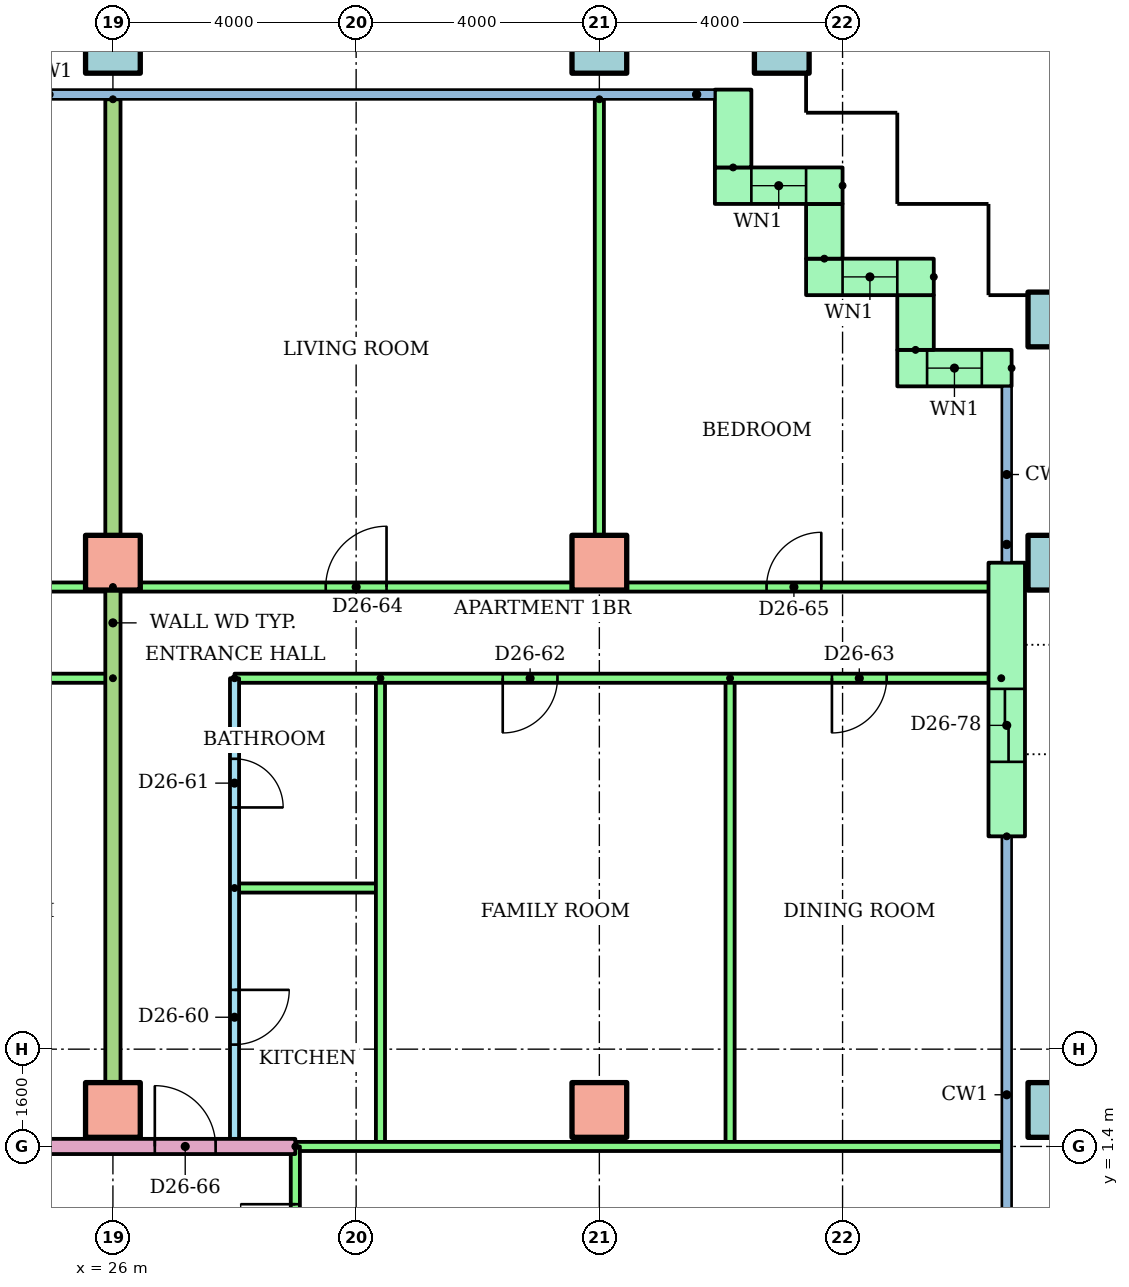
"""IFC4 building model, lengths in metres.
Left out: names, types, materials, properties, quantities, classifications, styles, units other than length and angle.
Written with IfcOpenShell. Run it as: python <this file> out.ifc"""

import sys

from ifc_helpers import new_model, si_unit, direction, frame, frame_2d, origin, origin_2d, place, context, subcontext, project, spatial, rectangle, hollow_rectangle, extrude, element, fill, save


model = new_model("IFC4")
c1 = context("Model", 3, precision=1e-05, world=origin(), true_north=direction((0.0, 1.0)))
c2 = subcontext(c1, "Body", "Model", "MODEL_VIEW")
j1 = project(units=[si_unit("LENGTHUNIT", "METRE"), si_unit("PLANEANGLEUNIT", "RADIAN")], contexts=[c1])
p1 = place(None, origin())
s1 = spatial("IfcSite", under=j1, at=p1, CompositionType="ELEMENT")
p2 = place(p1, origin())
s2 = spatial("IfcBuilding", under=s1, at=p2, CompositionType="ELEMENT")
p3 = place(p2, frame((0.0, 0.0, 99.9)))
s3 = spatial("IfcBuildingStorey", under=s2, at=p3, CompositionType="ELEMENT", Elevation=99.9)
for number, where in (
    (1, (26.0, 2.0, 0.0)),
    (2, (34.0, 2.0, 0.0)),
):
    element("IfcColumn", number, at=place(p3, frame(where)), inside=s3, PredefinedType="COLUMN", context=c2, shape_type="SweptSolid", body=[
        extrude(rectangle(XDim=0.9, YDim=0.9, at=origin_2d()), origin(), (0.0, 0.0, 1.0), 3.2),
    ])
p4 = place(p3, frame((41.5, 2.0, 0.0)))
e3 = element("IfcColumn", 3, at=p4, inside=s3, PredefinedType="COLUMN", context=c2, shape_type="SweptSolid", body=[
    extrude(hollow_rectangle(XDim=0.9, YDim=0.9, WallThickness=0.045, at=origin_2d()), origin(), (0.0, 0.0, 1.0), 3.2),
])
for number, where in (
    (4, (26.0, 11.0, 0.0)),
    (5, (34.0, 11.0, 0.0)),
):
    element("IfcColumn", number, at=place(p3, frame(where)), inside=s3, PredefinedType="COLUMN", context=c2, shape_type="SweptSolid", body=[
        extrude(rectangle(XDim=0.9, YDim=0.9, at=origin_2d()), origin(), (0.0, 0.0, 1.0), 3.2),
    ])
for number, where in (
    (6, (41.5, 11.0, 0.0)),
    (7, (41.5, 15.0, 0.0)),
    (8, (26.0, 19.5, 0.0)),
    (9, (34.0, 19.5, 0.0)),
    (10, (37.0, 19.5, 0.0)),
):
    element("IfcColumn", number, at=place(p3, frame(where)), inside=s3, PredefinedType="COLUMN", context=c2, shape_type="SweptSolid", body=[
        extrude(hollow_rectangle(XDim=0.9, YDim=0.9, WallThickness=0.045, at=origin_2d()), origin(), (0.0, 0.0, 1.0), 3.2),
    ])
p5 = place(p3, frame((40.78, 14.2, 0.0), z_axis=(0.0, 0.0, 1.0), x_axis=(-1.0, 0.0, 0.0)))
e11 = element("IfcWall", 11, at=p5, inside=s3, PredefinedType="STANDARD", context=c2, shape_type="SweptSolid", body=[
    extrude(rectangle(XDim=1.88, YDim=0.6, at=frame_2d((0.94, 0.0))), origin(), (0.0, 0.0, 1.0), 2.92),
])
p6 = place(p5, frame((0.49, 0.0, 0.9)))
e12 = element("IfcOpeningElement", 12, at=p6, cuts=e11, PredefinedType="OPENING", context=c2, shape_type="SweptSolid", body=[
    extrude(rectangle(XDim=0.9, YDim=1.5, at=frame_2d((0.45, 0.75))), frame((0.0, 0.31, 0.0), z_axis=(0.0, -1.0, 0.0), x_axis=(1.0, 0.0, 0.0)), (0.0, 0.0, 1.0), 0.62),
])
p7 = place(p3, frame((39.2, 14.5, 0.0), z_axis=(0.0, 0.0, 1.0), x_axis=(0.0, 1.0, 0.0)))
e13 = element("IfcWall", 13, at=p7, inside=s3, PredefinedType="STANDARD", context=c2, shape_type="SweptSolid", body=[
    extrude(rectangle(XDim=0.9, YDim=0.6, at=frame_2d((0.45, 0.0))), origin(), (0.0, 0.0, 1.0), 2.92),
])
p8 = place(p3, frame((39.5, 15.7, 0.0), z_axis=(0.0, 0.0, 1.0), x_axis=(-1.0, 0.0, 0.0)))
e14 = element("IfcWall", 14, at=p8, inside=s3, PredefinedType="STANDARD", context=c2, shape_type="SweptSolid", body=[
    extrude(rectangle(XDim=2.1, YDim=0.6, at=frame_2d((1.05, 0.0))), origin(), (0.0, 0.0, 1.0), 2.92),
])
p9 = place(p8, frame((0.6, 0.0, 0.9)))
e15 = element("IfcOpeningElement", 15, at=p9, cuts=e14, PredefinedType="OPENING", context=c2, shape_type="SweptSolid", body=[
    extrude(rectangle(XDim=0.9, YDim=1.5, at=frame_2d((0.45, 0.75))), frame((0.0, 0.31, 0.0), z_axis=(0.0, -1.0, 0.0), x_axis=(1.0, 0.0, 0.0)), (0.0, 0.0, 1.0), 0.62),
])
p10 = place(p3, frame((37.7, 16.0, 0.0), z_axis=(0.0, 0.0, 1.0), x_axis=(0.0, 1.0, 0.0)))
e16 = element("IfcWall", 16, at=p10, inside=s3, PredefinedType="STANDARD", context=c2, shape_type="SweptSolid", body=[
    extrude(rectangle(XDim=0.9, YDim=0.6, at=frame_2d((0.45, 0.0))), origin(), (0.0, 0.0, 1.0), 2.92),
])
p11 = place(p3, frame((38.0, 17.2, 0.0), z_axis=(0.0, 0.0, 1.0), x_axis=(-1.0, 0.0, 0.0)))
e17 = element("IfcWall", 17, at=p11, inside=s3, PredefinedType="STANDARD", context=c2, shape_type="SweptSolid", body=[
    extrude(rectangle(XDim=2.1, YDim=0.6, at=frame_2d((1.05, 0.0))), origin(), (0.0, 0.0, 1.0), 2.92),
])
p12 = place(p11, frame((0.6, 0.0, 0.9)))
e18 = element("IfcOpeningElement", 18, at=p12, cuts=e17, PredefinedType="OPENING", context=c2, shape_type="SweptSolid", body=[
    extrude(rectangle(XDim=0.9, YDim=1.5, at=frame_2d((0.45, 0.75))), frame((0.0, 0.31, 0.0), z_axis=(0.0, -1.0, 0.0), x_axis=(1.0, 0.0, 0.0)), (0.0, 0.0, 1.0), 0.62),
])
p13 = place(p3, frame((36.2, 17.5, 0.0), z_axis=(0.0, 0.0, 1.0), x_axis=(0.0, 1.0, 0.0)))
e19 = element("IfcWall", 19, at=p13, inside=s3, PredefinedType="STANDARD", context=c2, shape_type="SweptSolid", body=[
    extrude(rectangle(XDim=1.28, YDim=0.6, at=frame_2d((0.64, 0.0))), origin(), (0.0, 0.0, 1.0), 2.92),
])
p14 = place(p3, frame((40.7, 6.5, 0.0), z_axis=(0.0, 0.0, 1.0), x_axis=(0.0, 1.0, 0.0)))
e20 = element("IfcWall", 20, at=p14, inside=s3, PredefinedType="STANDARD", context=c2, shape_type="SweptSolid", body=[
    extrude(rectangle(XDim=4.5, YDim=0.6, at=frame_2d((2.25, 0.0))), origin(), (0.0, 0.0, 1.0), 2.92),
])
p15 = place(p14, frame((1.225, 0.0, 0.0)))
e21 = element("IfcOpeningElement", 21, at=p15, cuts=e20, PredefinedType="OPENING", context=c2, shape_type="SweptSolid", body=[
    extrude(rectangle(XDim=1.2, YDim=2.1, at=frame_2d((0.6, 1.05))), frame((0.0, 0.31, 0.0), z_axis=(0.0, -1.0, 0.0), x_axis=(1.0, 0.0, 0.0)), (0.0, 0.0, 1.0), 0.62),
])
p16 = place(p3, frame((26.0, 9.1, 0.0), z_axis=(0.0, 0.0, 1.0), x_axis=(-1.0, 0.0, 0.0)))
e22 = element("IfcWall", 22, at=p16, inside=s3, PredefinedType="PARTITIONING", context=c2, shape_type="SweptSolid", body=[
    extrude(rectangle(XDim=10.0, YDim=0.15, at=frame_2d((5.0, 0.0))), origin(), (0.0, 0.0, 1.0), 2.4),
])
p17 = place(p16, frame((5.525, 0.0, 0.0)))
e23 = element("IfcOpeningElement", 23, at=p17, cuts=e22, PredefinedType="OPENING", context=c2, shape_type="SweptSolid", body=[
    extrude(rectangle(XDim=0.9, YDim=2.1, at=frame_2d((0.45, 1.05))), frame((0.0, 0.085, 0.0), z_axis=(0.0, -1.0, 0.0), x_axis=(1.0, 0.0, 0.0)), (0.0, 0.0, 1.0), 0.17),
])
p18 = place(p16, frame((1.725, 0.0, 0.0)))
e24 = element("IfcOpeningElement", 24, at=p18, cuts=e22, PredefinedType="OPENING", context=c2, shape_type="SweptSolid", body=[
    extrude(rectangle(XDim=0.9, YDim=2.1, at=frame_2d((0.45, 1.05))), frame((0.0, 0.085, 0.0), z_axis=(0.0, -1.0, 0.0), x_axis=(1.0, 0.0, 0.0)), (0.0, 0.0, 1.0), 0.17),
])
p19 = place(p3, frame((14.0, 10.6, 0.0)))
e25 = element("IfcWall", 25, at=p19, inside=s3, PredefinedType="PARTITIONING", context=c2, shape_type="SweptSolid", body=[
    extrude(rectangle(XDim=12.0, YDim=0.15, at=frame_2d((6.0, 0.0))), origin(), (0.0, 0.0, 1.0), 2.4),
])
p20 = place(p19, frame((1.5, 0.0, 0.0)))
e26 = element("IfcOpeningElement", 26, at=p20, cuts=e25, PredefinedType="OPENING", context=c2, shape_type="SweptSolid", body=[
    extrude(rectangle(XDim=1.0, YDim=2.1, at=frame_2d((0.5, 1.05))), frame((0.0, 0.085, 0.0), z_axis=(0.0, -1.0, 0.0), x_axis=(1.0, 0.0, 0.0)), (0.0, 0.0, 1.0), 0.17),
])
p21 = place(p19, frame((7.5, 0.0, 0.0)))
e27 = element("IfcOpeningElement", 27, at=p21, cuts=e25, PredefinedType="OPENING", context=c2, shape_type="SweptSolid", body=[
    extrude(rectangle(XDim=1.0, YDim=2.1, at=frame_2d((0.5, 1.05))), frame((0.0, 0.085, 0.0), z_axis=(0.0, -1.0, 0.0), x_axis=(1.0, 0.0, 0.0)), (0.0, 0.0, 1.0), 0.17),
])
p22 = place(p3, frame((28.0, 9.1, 0.0), z_axis=(0.0, 0.0, 1.0), x_axis=(0.0, -1.0, 0.0)))
e28 = element("IfcWall", 28, at=p22, inside=s3, PredefinedType="PARTITIONING", context=c2, shape_type="SweptSolid", body=[
    extrude(rectangle(XDim=7.7, YDim=0.15, at=frame_2d((3.85, 0.0))), origin(), (0.0, 0.0, 1.0), 2.4),
])
p23 = place(p22, frame((5.125, 0.0, 0.0)))
e29 = element("IfcOpeningElement", 29, at=p23, cuts=e28, PredefinedType="OPENING", context=c2, shape_type="SweptSolid", body=[
    extrude(rectangle(XDim=0.9, YDim=2.1, at=frame_2d((0.45, 1.05))), frame((0.0, 0.085, 0.0), z_axis=(0.0, -1.0, 0.0), x_axis=(1.0, 0.0, 0.0)), (0.0, 0.0, 1.0), 0.17),
])
p24 = place(p22, frame((1.325, 0.0, 0.0)))
e30 = element("IfcOpeningElement", 30, at=p24, cuts=e28, PredefinedType="OPENING", context=c2, shape_type="SweptSolid", body=[
    extrude(rectangle(XDim=0.8, YDim=2.1, at=frame_2d((0.4, 1.05))), frame((0.0, 0.085, 0.0), z_axis=(0.0, -1.0, 0.0), x_axis=(1.0, 0.0, 0.0)), (0.0, 0.0, 1.0), 0.17),
])
p25 = place(p3, frame((28.0, 5.65, 0.0)))
e31 = element("IfcWall", 31, at=p25, inside=s3, PredefinedType="PARTITIONING", context=c2, shape_type="SweptSolid", body=[
    extrude(rectangle(XDim=2.4, YDim=0.15, at=frame_2d((1.2, 0.0))), origin(), (0.0, 0.0, 1.0), 2.4),
])
for number, where, z_axis, x_axis in (
    (32, (30.4, 9.1, 0.0), (0.0, 0.0, 1.0), (0.0, -1.0, 0.0)),
    (33, (36.15, 9.1, 0.0), (0.0, 0.0, 1.0), (0.0, -1.0, 0.0)),
):
    element("IfcWall", number, at=place(p3, frame(where, z_axis=z_axis, x_axis=x_axis)), inside=s3, PredefinedType="PARTITIONING", context=c2, shape_type="SweptSolid", body=[
        extrude(rectangle(XDim=7.7, YDim=0.15, at=frame_2d((3.85, 0.0))), origin(), (0.0, 0.0, 1.0), 2.4),
    ])
p26 = place(p3, frame((40.61, 9.1, 0.0), z_axis=(0.0, 0.0, 1.0), x_axis=(-1.0, 0.0, 0.0)))
e34 = element("IfcWall", 34, at=p26, inside=s3, PredefinedType="PARTITIONING", context=c2, shape_type="SweptSolid", body=[
    extrude(rectangle(XDim=12.61, YDim=0.15, at=frame_2d((6.305, 0.0))), origin(), (0.0, 0.0, 1.0), 2.4),
])
p27 = place(p26, frame((7.299, 0.0, 0.0)))
e35 = element("IfcOpeningElement", 35, at=p27, cuts=e34, PredefinedType="OPENING", context=c2, shape_type="SweptSolid", body=[
    extrude(rectangle(XDim=0.9, YDim=2.1, at=frame_2d((0.45, 1.05))), frame((0.0, 0.085, 0.0), z_axis=(0.0, -1.0, 0.0), x_axis=(1.0, 0.0, 0.0)), (0.0, 0.0, 1.0), 0.17),
])
p28 = place(p26, frame((1.885, 0.0, 0.0)))
e36 = element("IfcOpeningElement", 36, at=p28, cuts=e34, PredefinedType="OPENING", context=c2, shape_type="SweptSolid", body=[
    extrude(rectangle(XDim=0.9, YDim=2.1, at=frame_2d((0.45, 1.05))), frame((0.0, 0.085, 0.0), z_axis=(0.0, -1.0, 0.0), x_axis=(1.0, 0.0, 0.0)), (0.0, 0.0, 1.0), 0.17),
])
p29 = place(p3, frame((26.0, 10.6, 0.0)))
e37 = element("IfcWall", 37, at=p29, inside=s3, PredefinedType="PARTITIONING", context=c2, shape_type="SweptSolid", body=[
    extrude(rectangle(XDim=14.61, YDim=0.15, at=frame_2d((7.305, 0.0))), origin(), (0.0, 0.0, 1.0), 2.4),
])
p30 = place(p29, frame((3.5, 0.0, 0.0)))
e38 = element("IfcOpeningElement", 38, at=p30, cuts=e37, PredefinedType="OPENING", context=c2, shape_type="SweptSolid", body=[
    extrude(rectangle(XDim=1.0, YDim=2.1, at=frame_2d((0.5, 1.05))), frame((0.0, 0.085, 0.0), z_axis=(0.0, -1.0, 0.0), x_axis=(1.0, 0.0, 0.0)), (0.0, 0.0, 1.0), 0.17),
])
p31 = place(p29, frame((10.75, 0.0, 0.0)))
e39 = element("IfcOpeningElement", 39, at=p31, cuts=e37, PredefinedType="OPENING", context=c2, shape_type="SweptSolid", body=[
    extrude(rectangle(XDim=0.9, YDim=2.1, at=frame_2d((0.45, 1.05))), frame((0.0, 0.085, 0.0), z_axis=(0.0, -1.0, 0.0), x_axis=(1.0, 0.0, 0.0)), (0.0, 0.0, 1.0), 0.17),
])
p32 = place(p3, frame((34.0, 18.621, 0.0), z_axis=(0.0, 0.0, 1.0), x_axis=(0.0, -1.0, 0.0)))
e40 = element("IfcWall", 40, at=p32, inside=s3, PredefinedType="PARTITIONING", context=c2, shape_type="SweptSolid", body=[
    extrude(rectangle(XDim=8.021, YDim=0.15, at=frame_2d((4.01, 0.0))), origin(), (0.0, 0.0, 1.0), 2.4),
])
p33 = place(p3, frame((26.0, 18.621, 0.0), z_axis=(0.0, 0.0, 1.0), x_axis=(0.0, -1.0, 0.0)))
e41 = element("IfcWall", 41, at=p33, inside=s3, PredefinedType="PARTITIONING", context=c2, shape_type="SweptSolid", body=[
    extrude(rectangle(XDim=17.221, YDim=0.25, at=frame_2d((8.611, 0.0))), origin(), (0.0, 0.0, 1.0), 2.4),
])
p34 = place(p3, frame((14.0, 1.4, 0.0)))
e42 = element("IfcWall", 42, at=p34, inside=s3, PredefinedType="PARTITIONING", context=c2, shape_type="SweptSolid", body=[
    extrude(rectangle(XDim=15.0, YDim=0.25, at=frame_2d((7.5, 0.0))), origin(), (0.0, 0.0, 1.0), 2.4),
])
p35 = place(p34, frame((0.5, 0.0, 0.0)))
e43 = element("IfcOpeningElement", 43, at=p35, cuts=e42, PredefinedType="OPENING", context=c2, shape_type="SweptSolid", body=[
    extrude(rectangle(XDim=1.0, YDim=2.1, at=frame_2d((0.5, 1.05))), frame((0.0, 0.135, 0.0), z_axis=(0.0, -1.0, 0.0), x_axis=(1.0, 0.0, 0.0)), (0.0, 0.0, 1.0), 0.27),
])
p36 = place(p34, frame((12.689, 0.0, 0.0)))
e44 = element("IfcOpeningElement", 44, at=p36, cuts=e42, PredefinedType="OPENING", context=c2, shape_type="SweptSolid", body=[
    extrude(rectangle(XDim=1.0, YDim=2.1, at=frame_2d((0.5, 1.05))), frame((0.0, 0.135, 0.0), z_axis=(0.0, -1.0, 0.0), x_axis=(1.0, 0.0, 0.0)), (0.0, 0.0, 1.0), 0.27),
])
p37 = place(p3, frame((29.0, 1.4, 0.0)))
e45 = element("IfcWall", 45, at=p37, inside=s3, PredefinedType="PARTITIONING", context=c2, shape_type="SweptSolid", body=[
    extrude(rectangle(XDim=11.62, YDim=0.15, at=frame_2d((5.81, 0.0))), origin(), (0.0, 0.0, 1.0), 2.4),
])
p38 = place(p3, frame((29.0, -1.4, 0.0), z_axis=(0.0, 0.0, 1.0), x_axis=(0.0, 1.0, 0.0)))
e46 = element("IfcWall", 46, at=p38, inside=s3, PredefinedType="PARTITIONING", context=c2, shape_type="SweptSolid", body=[
    extrude(rectangle(XDim=2.8, YDim=0.15, at=frame_2d((1.4, 0.0))), origin(), (0.0, 0.0, 1.0), 2.4),
])
p39 = place(p38, frame((0.95, 0.0, 0.0)))
e47 = element("IfcOpeningElement", 47, at=p39, cuts=e46, PredefinedType="OPENING", context=c2, shape_type="SweptSolid", body=[
    extrude(rectangle(XDim=0.9, YDim=2.1, at=frame_2d((0.45, 1.05))), frame((0.0, 0.085, 0.0), z_axis=(0.0, -1.0, 0.0), x_axis=(1.0, 0.0, 0.0)), (0.0, 0.0, 1.0), 0.17),
])
p40 = place(p6, origin())
e48 = element("IfcWindow", 48, at=p40, inside=s3, PartitioningType="SINGLE_PANEL", PredefinedType="WINDOW", context=c2, shape_type="SweptSolid", body=[
    extrude(rectangle(XDim=0.9, YDim=1.5, at=frame_2d((0.45, 0.75))), frame((0.0, 0.03, 0.0), z_axis=(0.0, -1.0, 0.0), x_axis=(1.0, 0.0, 0.0)), (0.0, 0.0, 1.0), 0.06),
])
fill(e12, e48)
p41 = place(p9, origin())
e49 = element("IfcWindow", 49, at=p41, inside=s3, PartitioningType="SINGLE_PANEL", PredefinedType="WINDOW", context=c2, shape_type="SweptSolid", body=[
    extrude(rectangle(XDim=0.9, YDim=1.5, at=frame_2d((0.45, 0.75))), frame((0.0, 0.03, 0.0), z_axis=(0.0, -1.0, 0.0), x_axis=(1.0, 0.0, 0.0)), (0.0, 0.0, 1.0), 0.06),
])
fill(e15, e49)
p42 = place(p12, origin())
e50 = element("IfcWindow", 50, at=p42, inside=s3, PartitioningType="SINGLE_PANEL", PredefinedType="WINDOW", context=c2, shape_type="SweptSolid", body=[
    extrude(rectangle(XDim=0.9, YDim=1.5, at=frame_2d((0.45, 0.75))), frame((0.0, 0.03, 0.0), z_axis=(0.0, -1.0, 0.0), x_axis=(1.0, 0.0, 0.0)), (0.0, 0.0, 1.0), 0.06),
])
fill(e18, e50)
p43 = place(p23, origin())
e51 = element("IfcDoor", 51, at=p43, inside=s3, OperationType="SINGLE_SWING_LEFT", PredefinedType="DOOR", context=c2, shape_type="SweptSolid", body=[
    extrude(rectangle(XDim=0.9, YDim=2.1, at=frame_2d((0.45, 1.05))), frame((0.0, 0.025, 0.0), z_axis=(0.0, -1.0, 0.0), x_axis=(1.0, 0.0, 0.0)), (0.0, 0.0, 1.0), 0.05),
])
fill(e29, e51)
p44 = place(p24, origin())
e52 = element("IfcDoor", 52, at=p44, inside=s3, OperationType="SINGLE_SWING_RIGHT", PredefinedType="DOOR", context=c2, shape_type="SweptSolid", body=[
    extrude(rectangle(XDim=0.8, YDim=2.1, at=frame_2d((0.4, 1.05))), frame((0.0, 0.025, 0.0), z_axis=(0.0, -1.0, 0.0), x_axis=(1.0, 0.0, 0.0)), (0.0, 0.0, 1.0), 0.05),
])
fill(e30, e52)
p45 = place(p27, origin())
e53 = element("IfcDoor", 53, at=p45, inside=s3, OperationType="SINGLE_SWING_RIGHT", PredefinedType="DOOR", context=c2, shape_type="SweptSolid", body=[
    extrude(rectangle(XDim=0.9, YDim=2.1, at=frame_2d((0.45, 1.05))), frame((0.0, 0.025, 0.0), z_axis=(0.0, -1.0, 0.0), x_axis=(1.0, 0.0, 0.0)), (0.0, 0.0, 1.0), 0.05),
])
fill(e35, e53)
p46 = place(p28, origin())
e54 = element("IfcDoor", 54, at=p46, inside=s3, OperationType="SINGLE_SWING_RIGHT", PredefinedType="DOOR", context=c2, shape_type="SweptSolid", body=[
    extrude(rectangle(XDim=0.9, YDim=2.1, at=frame_2d((0.45, 1.05))), frame((0.0, 0.025, 0.0), z_axis=(0.0, -1.0, 0.0), x_axis=(1.0, 0.0, 0.0)), (0.0, 0.0, 1.0), 0.05),
])
fill(e36, e54)
p47 = place(p30, origin())
e55 = element("IfcDoor", 55, at=p47, inside=s3, OperationType="SINGLE_SWING_RIGHT", PredefinedType="DOOR", context=c2, shape_type="SweptSolid", body=[
    extrude(rectangle(XDim=1.0, YDim=2.1, at=frame_2d((0.5, 1.05))), frame((0.0, 0.025, 0.0), z_axis=(0.0, -1.0, 0.0), x_axis=(1.0, 0.0, 0.0)), (0.0, 0.0, 1.0), 0.05),
])
fill(e38, e55)
p48 = place(p31, origin())
e56 = element("IfcDoor", 56, at=p48, inside=s3, OperationType="SINGLE_SWING_RIGHT", PredefinedType="DOOR", context=c2, shape_type="SweptSolid", body=[
    extrude(rectangle(XDim=0.9, YDim=2.1, at=frame_2d((0.45, 1.05))), frame((0.0, 0.025, 0.0), z_axis=(0.0, -1.0, 0.0), x_axis=(1.0, 0.0, 0.0)), (0.0, 0.0, 1.0), 0.05),
])
fill(e39, e56)
p49 = place(p36, origin())
e57 = element("IfcDoor", 57, at=p49, inside=s3, OperationType="SINGLE_SWING_LEFT", PredefinedType="DOOR", context=c2, shape_type="SweptSolid", body=[
    extrude(rectangle(XDim=1.0, YDim=2.1, at=frame_2d((0.5, 1.05))), frame((0.0, 0.025, 0.0), z_axis=(0.0, -1.0, 0.0), x_axis=(1.0, 0.0, 0.0)), (0.0, 0.0, 1.0), 0.05),
])
fill(e44, e57)
p50 = place(p39, origin())
e58 = element("IfcDoor", 58, at=p50, inside=s3, OperationType="SINGLE_SWING_RIGHT", PredefinedType="DOOR", context=c2, shape_type="SweptSolid", body=[
    extrude(rectangle(XDim=0.9, YDim=2.1, at=frame_2d((0.45, 1.05))), frame((0.0, 0.025, 0.0), z_axis=(0.0, -1.0, 0.0), x_axis=(1.0, 0.0, 0.0)), (0.0, 0.0, 1.0), 0.05),
])
fill(e47, e58)
p51 = place(p15, origin())
e59 = element("IfcDoor", 59, at=p51, inside=s3, OperationType="SLIDING_TO_LEFT", PredefinedType="DOOR", context=c2, shape_type="SweptSolid", body=[
    extrude(rectangle(XDim=1.2, YDim=2.1, at=frame_2d((0.6, 1.05))), frame((0.0, 0.025, 0.0), z_axis=(0.0, -1.0, 0.0), x_axis=(1.0, 0.0, 0.0)), (0.0, 0.0, 1.0), 0.05),
])
fill(e21, e59)
save(model, sys.argv[1])
